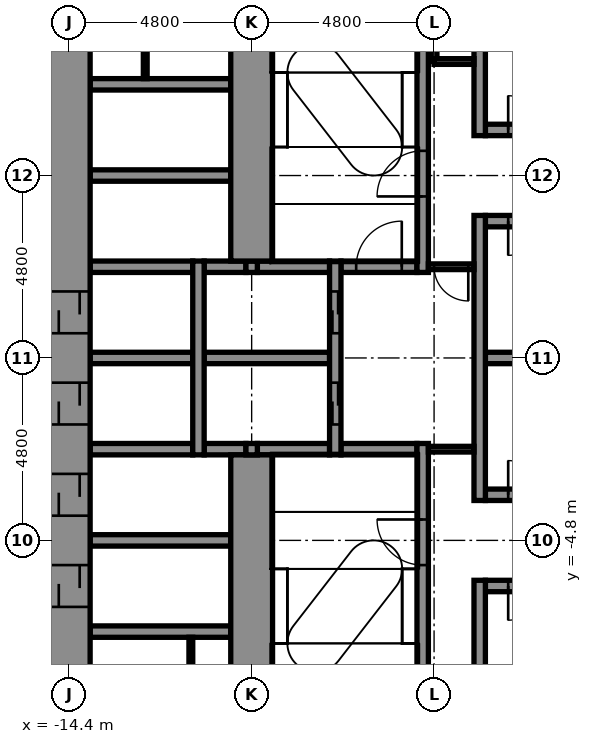
"""IFC4 building model, lengths in metres.
Left out: names, types, materials, properties, quantities, classifications, styles, units other than length and angle.
Written with IfcOpenShell. Run it as: python <this file> out.ifc"""

import sys

from ifc_helpers import new_model, si_unit, direction, frame, frame_2d, origin, place, context, subcontext, project, spatial, rectangle, extrude, element, fill, save


model = new_model("IFC4")
c1 = context("Model", 3, precision=1e-05, world=origin(), true_north=direction((0.0, 1.0)))
c2 = subcontext(c1, "Body", "Model", "MODEL_VIEW")
j1 = project(units=[si_unit("LENGTHUNIT", "METRE"), si_unit("PLANEANGLEUNIT", "RADIAN")], contexts=[c1])
p1 = place(None, origin())
s1 = spatial("IfcSite", under=j1, at=p1, CompositionType="ELEMENT")
p2 = place(p1, origin())
s2 = spatial("IfcBuilding", under=s1, at=p2, CompositionType="ELEMENT")
p3 = place(p2, frame((0.0, 0.0, 22.4)))
s3 = spatial("IfcBuildingStorey", under=s2, at=p3, CompositionType="ELEMENT", Elevation=22.4)
p4 = place(p3, frame((-13.85, -7.2, -0.25), z_axis=(0.0, 0.0, 1.0), x_axis=(1.0, 0.0, 0.0)))
e1 = element("IfcWall", 1, at=p4, inside=s3, PredefinedType="STANDARD", context=c2, shape_type="SweptSolid", body=[
    extrude(rectangle(XDim=3.7, YDim=0.3, at=frame_2d((1.85, 0.0))), origin(), (0.0, 0.0, 1.0), 5.5),
])
p5 = place(p3, frame((-3.45, -6.0, -0.25), z_axis=(0.0, 0.0, 1.0), x_axis=(1.0, 0.0, 0.0)))
e2 = element("IfcWall", 2, at=p5, inside=s3, PredefinedType="STANDARD", context=c2, shape_type="SweptSolid", body=[
    extrude(rectangle(XDim=2.1, YDim=0.3, at=frame_2d((1.05, 0.0))), origin(), (0.0, 0.0, 1.0), 5.5),
])
p6 = place(p5, frame((0.6, 0.0, 0.25)))
e3 = element("IfcOpeningElement", 3, at=p6, cuts=e2, PredefinedType="OPENING", context=c2, shape_type="SweptSolid", body=[
    extrude(rectangle(XDim=0.9, YDim=2.1, at=frame_2d((0.45, 1.05))), frame((0.0, 0.16, 0.0), z_axis=(0.0, -1.0, 0.0), x_axis=(1.0, 0.0, 0.0)), (0.0, 0.0, 1.0), 0.32),
])
p7 = place(p3, frame((-13.85, -4.8, -0.25), z_axis=(0.0, 0.0, 1.0), x_axis=(1.0, 0.0, 0.0)))
e4 = element("IfcWall", 4, at=p7, inside=s3, PredefinedType="STANDARD", context=c2, shape_type="SweptSolid", body=[
    extrude(rectangle(XDim=3.7, YDim=0.3, at=frame_2d((1.85, 0.0))), origin(), (0.0, 0.0, 1.0), 5.5),
])
p8 = place(p3, frame((-3.45, -3.6, -0.25), z_axis=(0.0, 0.0, 1.0), x_axis=(1.0, 0.0, 0.0)))
e5 = element("IfcWall", 5, at=p8, inside=s3, PredefinedType="STANDARD", context=c2, shape_type="SweptSolid", body=[
    extrude(rectangle(XDim=2.1, YDim=0.3, at=frame_2d((1.05, 0.0))), origin(), (0.0, 0.0, 1.0), 5.5),
])
p9 = place(p8, frame((0.6, 0.0, 0.25)))
e6 = element("IfcOpeningElement", 6, at=p9, cuts=e5, PredefinedType="OPENING", context=c2, shape_type="SweptSolid", body=[
    extrude(rectangle(XDim=0.9, YDim=2.1, at=frame_2d((0.45, 1.05))), frame((0.0, 0.16, 0.0), z_axis=(0.0, -1.0, 0.0), x_axis=(1.0, 0.0, 0.0)), (0.0, 0.0, 1.0), 0.32),
])
p10 = place(p3, frame((-13.85, -2.4, -0.25), z_axis=(0.0, 0.0, 1.0), x_axis=(1.0, 0.0, 0.0)))
e7 = element("IfcWall", 7, at=p10, inside=s3, PredefinedType="STANDARD", context=c2, shape_type="SweptSolid", body=[
    extrude(rectangle(XDim=2.7, YDim=0.3, at=frame_2d((1.35, 0.0))), origin(), (0.0, 0.0, 1.0), 5.5),
])
p11 = place(p3, frame((-10.85, -2.4, -0.25), z_axis=(0.0, 0.0, 1.0), x_axis=(1.0, 0.0, 0.0)))
e8 = element("IfcWall", 8, at=p11, inside=s3, PredefinedType="STANDARD", context=c2, shape_type="SweptSolid", body=[
    extrude(rectangle(XDim=1.1, YDim=0.3, at=frame_2d((0.55, 0.0))), origin(), (0.0, 0.0, 1.0), 5.5),
])
p12 = place(p3, frame((-9.45, -2.4, -0.25), z_axis=(0.0, 0.0, 1.0), x_axis=(1.0, 0.0, 0.0)))
e9 = element("IfcWall", 9, at=p12, inside=s3, PredefinedType="STANDARD", context=c2, shape_type="SweptSolid", body=[
    extrude(rectangle(XDim=1.9, YDim=0.3, at=frame_2d((0.95, 0.0))), origin(), (0.0, 0.0, 1.0), 5.5),
])
p13 = place(p3, frame((-7.25, -2.4, -0.25), z_axis=(0.0, 0.0, 1.0), x_axis=(1.0, 0.0, 0.0)))
e10 = element("IfcWall", 10, at=p13, inside=s3, PredefinedType="STANDARD", context=c2, shape_type="SweptSolid", body=[
    extrude(rectangle(XDim=2.0, YDim=0.3, at=frame_2d((1.0, 0.0))), origin(), (0.0, 0.0, 1.0), 5.5),
])
p14 = place(p3, frame((-13.85, 0.0, -0.25), z_axis=(0.0, 0.0, 1.0), x_axis=(1.0, 0.0, 0.0)))
e11 = element("IfcWall", 11, at=p14, inside=s3, PredefinedType="STANDARD", context=c2, shape_type="SweptSolid", body=[
    extrude(rectangle(XDim=2.7, YDim=0.3, at=frame_2d((1.35, 0.0))), origin(), (0.0, 0.0, 1.0), 5.5),
])
p15 = place(p3, frame((-10.85, 0.0, -0.25), z_axis=(0.0, 0.0, 1.0), x_axis=(1.0, 0.0, 0.0)))
e12 = element("IfcWall", 12, at=p15, inside=s3, PredefinedType="STANDARD", context=c2, shape_type="SweptSolid", body=[
    extrude(rectangle(XDim=3.3, YDim=0.3, at=frame_2d((1.65, 0.0))), origin(), (0.0, 0.0, 1.0), 5.5),
])
p16 = place(p3, frame((-3.45, 0.0, -0.25), z_axis=(0.0, 0.0, 1.0), x_axis=(1.0, 0.0, 0.0)))
e13 = element("IfcWall", 13, at=p16, inside=s3, PredefinedType="STANDARD", context=c2, shape_type="SweptSolid", body=[
    extrude(rectangle(XDim=2.1, YDim=0.3, at=frame_2d((1.05, 0.0))), origin(), (0.0, 0.0, 1.0), 5.5),
])
p17 = place(p3, frame((-13.85, 2.4, -0.25), z_axis=(0.0, 0.0, 1.0), x_axis=(1.0, 0.0, 0.0)))
e14 = element("IfcWall", 14, at=p17, inside=s3, PredefinedType="STANDARD", context=c2, shape_type="SweptSolid", body=[
    extrude(rectangle(XDim=2.7, YDim=0.3, at=frame_2d((1.35, 0.0))), origin(), (0.0, 0.0, 1.0), 5.5),
])
p18 = place(p3, frame((-10.85, 2.4, -0.25), z_axis=(0.0, 0.0, 1.0), x_axis=(1.0, 0.0, 0.0)))
e15 = element("IfcWall", 15, at=p18, inside=s3, PredefinedType="STANDARD", context=c2, shape_type="SweptSolid", body=[
    extrude(rectangle(XDim=1.1, YDim=0.3, at=frame_2d((0.55, 0.0))), origin(), (0.0, 0.0, 1.0), 5.5),
])
p19 = place(p3, frame((-9.45, 2.4, -0.25), z_axis=(0.0, 0.0, 1.0), x_axis=(1.0, 0.0, 0.0)))
e16 = element("IfcWall", 16, at=p19, inside=s3, PredefinedType="STANDARD", context=c2, shape_type="SweptSolid", body=[
    extrude(rectangle(XDim=1.9, YDim=0.3, at=frame_2d((0.95, 0.0))), origin(), (0.0, 0.0, 1.0), 5.5),
])
p20 = place(p3, frame((-7.25, 2.4, -0.25), z_axis=(0.0, 0.0, 1.0), x_axis=(1.0, 0.0, 0.0)))
e17 = element("IfcWall", 17, at=p20, inside=s3, PredefinedType="STANDARD", context=c2, shape_type="SweptSolid", body=[
    extrude(rectangle(XDim=2.0, YDim=0.3, at=frame_2d((1.0, 0.0))), origin(), (0.0, 0.0, 1.0), 5.5),
])
p21 = place(p20, frame((0.4, 0.0, 0.25)))
e18 = element("IfcOpeningElement", 18, at=p21, cuts=e17, PredefinedType="OPENING", context=c2, shape_type="SweptSolid", body=[
    extrude(rectangle(XDim=1.2, YDim=2.1, at=frame_2d((0.6, 1.05))), frame((0.0, 0.16, 0.0), z_axis=(0.0, -1.0, 0.0), x_axis=(1.0, 0.0, 0.0)), (0.0, 0.0, 1.0), 0.32),
])
p22 = place(p3, frame((-3.45, 3.6, -0.25), z_axis=(0.0, 0.0, 1.0), x_axis=(1.0, 0.0, 0.0)))
e19 = element("IfcWall", 19, at=p22, inside=s3, PredefinedType="STANDARD", context=c2, shape_type="SweptSolid", body=[
    extrude(rectangle(XDim=2.1, YDim=0.3, at=frame_2d((1.05, 0.0))), origin(), (0.0, 0.0, 1.0), 5.5),
])
p23 = place(p22, frame((0.6, 0.0, 0.25)))
e20 = element("IfcOpeningElement", 20, at=p23, cuts=e19, PredefinedType="OPENING", context=c2, shape_type="SweptSolid", body=[
    extrude(rectangle(XDim=0.9, YDim=2.1, at=frame_2d((0.45, 1.05))), frame((0.0, 0.16, 0.0), z_axis=(0.0, -1.0, 0.0), x_axis=(1.0, 0.0, 0.0)), (0.0, 0.0, 1.0), 0.32),
])
p24 = place(p3, frame((-13.85, 4.8, -0.25), z_axis=(0.0, 0.0, 1.0), x_axis=(1.0, 0.0, 0.0)))
e21 = element("IfcWall", 21, at=p24, inside=s3, PredefinedType="STANDARD", context=c2, shape_type="SweptSolid", body=[
    extrude(rectangle(XDim=3.7, YDim=0.3, at=frame_2d((1.85, 0.0))), origin(), (0.0, 0.0, 1.0), 5.5),
])
p25 = place(p3, frame((-3.45, 6.0, -0.25), z_axis=(0.0, 0.0, 1.0), x_axis=(1.0, 0.0, 0.0)))
e22 = element("IfcWall", 22, at=p25, inside=s3, PredefinedType="STANDARD", context=c2, shape_type="SweptSolid", body=[
    extrude(rectangle(XDim=2.1, YDim=0.3, at=frame_2d((1.05, 0.0))), origin(), (0.0, 0.0, 1.0), 5.5),
])
p26 = place(p25, frame((0.6, 0.0, 0.25)))
e23 = element("IfcOpeningElement", 23, at=p26, cuts=e22, PredefinedType="OPENING", context=c2, shape_type="SweptSolid", body=[
    extrude(rectangle(XDim=0.9, YDim=2.1, at=frame_2d((0.45, 1.05))), frame((0.0, 0.16, 0.0), z_axis=(0.0, -1.0, 0.0), x_axis=(1.0, 0.0, 0.0)), (0.0, 0.0, 1.0), 0.32),
])
p27 = place(p3, frame((-13.85, 7.2, -0.25), z_axis=(0.0, 0.0, 1.0), x_axis=(1.0, 0.0, 0.0)))
e24 = element("IfcWall", 24, at=p27, inside=s3, PredefinedType="STANDARD", context=c2, shape_type="SweptSolid", body=[
    extrude(rectangle(XDim=3.7, YDim=0.3, at=frame_2d((1.85, 0.0))), origin(), (0.0, 0.0, 1.0), 5.5),
])
p28 = place(p3, frame((-14.4, -10.15, -0.25), z_axis=(0.0, 0.0, 1.0), x_axis=(0.0, 1.0, 0.0)))
e25 = element("IfcWall", 25, at=p28, inside=s3, PredefinedType="SHEAR", context=c2, shape_type="SweptSolid", body=[
    extrude(rectangle(XDim=20.3, YDim=1.1, at=frame_2d((10.15, 0.0))), origin(), (0.0, 0.0, 1.0), 5.5),
])
p29 = place(p28, frame((3.6, 0.0, 0.25)))
e26 = element("IfcOpeningElement", 26, at=p29, cuts=e25, PredefinedType="OPENING", context=c2, shape_type="SweptSolid", body=[
    extrude(rectangle(XDim=1.1, YDim=2.1, at=frame_2d((0.55, 1.05))), frame((0.0, 0.56, 0.0), z_axis=(0.0, -1.0, 0.0), x_axis=(1.0, 0.0, 0.0)), (0.0, 0.0, 1.0), 1.12),
])
p30 = place(p28, frame((6.0, 0.0, 0.25)))
e27 = element("IfcOpeningElement", 27, at=p30, cuts=e25, PredefinedType="OPENING", context=c2, shape_type="SweptSolid", body=[
    extrude(rectangle(XDim=1.1, YDim=2.1, at=frame_2d((0.55, 1.05))), frame((0.0, 0.56, 0.0), z_axis=(0.0, -1.0, 0.0), x_axis=(1.0, 0.0, 0.0)), (0.0, 0.0, 1.0), 1.12),
])
p31 = place(p28, frame((8.4, 0.0, 0.25)))
e28 = element("IfcOpeningElement", 28, at=p31, cuts=e25, PredefinedType="OPENING", context=c2, shape_type="SweptSolid", body=[
    extrude(rectangle(XDim=1.1, YDim=2.1, at=frame_2d((0.55, 1.05))), frame((0.0, 0.56, 0.0), z_axis=(0.0, -1.0, 0.0), x_axis=(1.0, 0.0, 0.0)), (0.0, 0.0, 1.0), 1.12),
])
p32 = place(p28, frame((10.8, 0.0, 0.25)))
e29 = element("IfcOpeningElement", 29, at=p32, cuts=e25, PredefinedType="OPENING", context=c2, shape_type="SweptSolid", body=[
    extrude(rectangle(XDim=1.1, YDim=2.1, at=frame_2d((0.55, 1.05))), frame((0.0, 0.56, 0.0), z_axis=(0.0, -1.0, 0.0), x_axis=(1.0, 0.0, 0.0)), (0.0, 0.0, 1.0), 1.12),
])
p33 = place(p3, frame((-11.0, -2.55, -0.25), z_axis=(0.0, 0.0, 1.0), x_axis=(0.0, 1.0, 0.0)))
e30 = element("IfcWall", 30, at=p33, inside=s3, PredefinedType="STANDARD", context=c2, shape_type="SweptSolid", body=[
    extrude(rectangle(XDim=5.1, YDim=0.3, at=frame_2d((2.55, 0.0))), origin(), (0.0, 0.0, 1.0), 5.5),
])
p34 = place(p3, frame((-9.6, -10.15, -0.25), z_axis=(0.0, 0.0, 1.0), x_axis=(0.0, 1.0, 0.0)))
e31 = element("IfcWall", 31, at=p34, inside=s3, PredefinedType="SHEAR", context=c2, shape_type="SweptSolid", body=[
    extrude(rectangle(XDim=7.6, YDim=1.1, at=frame_2d((3.8, 0.0))), origin(), (0.0, 0.0, 1.0), 5.5),
])
for number, where, z_axis, x_axis in (
    (32, (-9.6, -2.55, -0.25), (0.0, 0.0, 1.0), (0.0, 1.0, 0.0)),
    (33, (-9.6, 2.25, -0.25), (0.0, 0.0, 1.0), (0.0, 1.0, 0.0)),
):
    element("IfcWall", number, at=place(p3, frame(where, z_axis=z_axis, x_axis=x_axis)), inside=s3, PredefinedType="STANDARD", context=c2, shape_type="SweptSolid", body=[
        extrude(rectangle(XDim=0.3, YDim=0.3, at=frame_2d((0.15, 0.0))), origin(), (0.0, 0.0, 1.0), 5.5),
    ])
p35 = place(p3, frame((-9.6, 2.55, -0.25), z_axis=(0.0, 0.0, 1.0), x_axis=(0.0, 1.0, 0.0)))
e34 = element("IfcWall", 34, at=p35, inside=s3, PredefinedType="SHEAR", context=c2, shape_type="SweptSolid", body=[
    extrude(rectangle(XDim=7.6, YDim=1.1, at=frame_2d((3.8, 0.0))), origin(), (0.0, 0.0, 1.0), 5.5),
])
p36 = place(p3, frame((-7.4, -2.55, -0.25), z_axis=(0.0, 0.0, 1.0), x_axis=(0.0, 1.0, 0.0)))
e35 = element("IfcWall", 35, at=p36, inside=s3, PredefinedType="STANDARD", context=c2, shape_type="SweptSolid", body=[
    extrude(rectangle(XDim=5.1, YDim=0.3, at=frame_2d((2.55, 0.0))), origin(), (0.0, 0.0, 1.0), 5.5),
])
p37 = place(p36, frame((0.8, 0.0, 0.25)))
e36 = element("IfcOpeningElement", 36, at=p37, cuts=e35, PredefinedType="OPENING", context=c2, shape_type="SweptSolid", body=[
    extrude(rectangle(XDim=1.1, YDim=2.1, at=frame_2d((0.55, 1.05))), frame((0.0, 0.16, 0.0), z_axis=(0.0, -1.0, 0.0), x_axis=(1.0, 0.0, 0.0)), (0.0, 0.0, 1.0), 0.32),
])
p38 = place(p36, frame((3.2, 0.0, 0.25)))
e37 = element("IfcOpeningElement", 37, at=p38, cuts=e35, PredefinedType="OPENING", context=c2, shape_type="SweptSolid", body=[
    extrude(rectangle(XDim=1.1, YDim=2.1, at=frame_2d((0.55, 1.05))), frame((0.0, 0.16, 0.0), z_axis=(0.0, -1.0, 0.0), x_axis=(1.0, 0.0, 0.0)), (0.0, 0.0, 1.0), 0.32),
])
p39 = place(p3, frame((-5.1, -9.05, -0.25), z_axis=(0.0, 0.0, 1.0), x_axis=(0.0, 1.0, 0.0)))
e38 = element("IfcWall", 38, at=p39, inside=s3, PredefinedType="STANDARD", context=c2, shape_type="SweptSolid", body=[
    extrude(rectangle(XDim=6.8, YDim=0.3, at=frame_2d((3.4, 0.0))), origin(), (0.0, 0.0, 1.0), 5.5),
])
p40 = place(p39, frame((3.6, 0.0, 0.25)))
e39 = element("IfcOpeningElement", 39, at=p40, cuts=e38, PredefinedType="OPENING", context=c2, shape_type="SweptSolid", body=[
    extrude(rectangle(XDim=1.2, YDim=2.1, at=frame_2d((0.6, 1.05))), frame((0.0, 0.16, 0.0), z_axis=(0.0, -1.0, 0.0), x_axis=(1.0, 0.0, 0.0)), (0.0, 0.0, 1.0), 0.32),
])
p41 = place(p3, frame((-5.1, 2.25, -0.25), z_axis=(0.0, 0.0, 1.0), x_axis=(0.0, 1.0, 0.0)))
e40 = element("IfcWall", 40, at=p41, inside=s3, PredefinedType="STANDARD", context=c2, shape_type="SweptSolid", body=[
    extrude(rectangle(XDim=6.8, YDim=0.3, at=frame_2d((3.4, 0.0))), origin(), (0.0, 0.0, 1.0), 5.5),
])
p42 = place(p41, frame((2.0, 0.0, 0.25)))
e41 = element("IfcOpeningElement", 41, at=p42, cuts=e40, PredefinedType="OPENING", context=c2, shape_type="SweptSolid", body=[
    extrude(rectangle(XDim=1.2, YDim=2.1, at=frame_2d((0.6, 1.05))), frame((0.0, 0.16, 0.0), z_axis=(0.0, -1.0, 0.0), x_axis=(1.0, 0.0, 0.0)), (0.0, 0.0, 1.0), 0.32),
])
p43 = place(p3, frame((-3.6, -9.05, -0.25), z_axis=(0.0, 0.0, 1.0), x_axis=(0.0, 1.0, 0.0)))
e42 = element("IfcWall", 42, at=p43, inside=s3, PredefinedType="STANDARD", context=c2, shape_type="SweptSolid", body=[
    extrude(rectangle(XDim=3.2, YDim=0.3, at=frame_2d((1.6, 0.0))), origin(), (0.0, 0.0, 1.0), 5.5),
])
p44 = place(p3, frame((-3.6, -3.75, -0.25), z_axis=(0.0, 0.0, 1.0), x_axis=(0.0, 1.0, 0.0)))
e43 = element("IfcWall", 43, at=p44, inside=s3, PredefinedType="STANDARD", context=c2, shape_type="SweptSolid", body=[
    extrude(rectangle(XDim=7.5, YDim=0.3, at=frame_2d((3.75, 0.0))), origin(), (0.0, 0.0, 1.0), 5.5),
])
p45 = place(p3, frame((-3.6, 5.85, -0.25), z_axis=(0.0, 0.0, 1.0), x_axis=(0.0, 1.0, 0.0)))
e44 = element("IfcWall", 44, at=p45, inside=s3, PredefinedType="STANDARD", context=c2, shape_type="SweptSolid", body=[
    extrude(rectangle(XDim=3.2, YDim=0.3, at=frame_2d((1.6, 0.0))), origin(), (0.0, 0.0, 1.0), 5.5),
])
p46 = place(p3, frame((-4.8, 7.8, 0.0), z_axis=(0.0, 0.0, 1.0), x_axis=(0.0, 1.0, 0.0)))
e45 = element("IfcWall", 45, at=p46, inside=s3, PredefinedType="PARTITIONING", context=c2, shape_type="SweptSolid", body=[
    extrude(rectangle(XDim=1.25, YDim=0.15, at=frame_2d((0.625, 0.0))), origin(), (0.0, 0.0, 1.0), 5.25),
])
for number, where, z_axis, x_axis in (
    (46, (-11.2, -9.05, 0.0), (0.0, 0.0, 1.0), (0.0, 1.0, 0.0)),
    (47, (-12.4, 7.35, 0.0), (0.0, 0.0, 1.0), (0.0, 1.0, 0.0)),
):
    element("IfcWall", number, at=place(p3, frame(where, z_axis=z_axis, x_axis=x_axis)), inside=s3, PredefinedType="PARTITIONING", context=c2, shape_type="SweptSolid", body=[
        extrude(rectangle(XDim=1.7, YDim=0.1, at=frame_2d((0.85, 0.0))), origin(), (0.0, 0.0, 1.0), 5.25),
    ])
p47 = place(p3, frame((-4.8, 7.8, 0.0), z_axis=(0.0, 0.0, 1.0), x_axis=(1.0, 0.0, 0.0)))
e48 = element("IfcWall", 48, at=p47, inside=s3, PredefinedType="PARTITIONING", context=c2, shape_type="SweptSolid", body=[
    extrude(rectangle(XDim=1.05, YDim=0.15, at=frame_2d((0.525, 0.0))), origin(), (0.0, 0.0, 1.0), 5.25),
])
p48 = place(p3, frame((-4.95, 2.4, 0.0), z_axis=(0.0, 0.0, 1.0), x_axis=(1.0, 0.0, 0.0)))
e49 = element("IfcWall", 49, at=p48, inside=s3, PredefinedType="PARTITIONING", context=c2, shape_type="SweptSolid", body=[
    extrude(rectangle(XDim=1.2, YDim=0.15, at=frame_2d((0.6, 0.0))), origin(), (0.0, 0.0, 1.0), 5.25),
])
p49 = place(p48, frame((0.15, 0.0, 0.0)))
e50 = element("IfcOpeningElement", 50, at=p49, cuts=e49, PredefinedType="OPENING", context=c2, shape_type="SweptSolid", body=[
    extrude(rectangle(XDim=0.9, YDim=2.1, at=frame_2d((0.45, 1.05))), frame((0.0, 0.085, 0.0), z_axis=(0.0, -1.0, 0.0), x_axis=(1.0, 0.0, 0.0)), (0.0, 0.0, 1.0), 0.17),
])
p50 = place(p3, frame((-4.95, -2.4, 0.0), z_axis=(0.0, 0.0, 1.0), x_axis=(1.0, 0.0, 0.0)))
e51 = element("IfcWall", 51, at=p50, inside=s3, PredefinedType="PARTITIONING", context=c2, shape_type="SweptSolid", body=[
    extrude(rectangle(XDim=1.2, YDim=0.15, at=frame_2d((0.6, 0.0))), origin(), (0.0, 0.0, 1.0), 5.25),
])
p51 = place(p37, origin())
e52 = element("IfcDoor", 52, at=p51, inside=s3, OperationType="DOUBLE_DOOR_SLIDING", PredefinedType="DOOR", context=c2, shape_type="SweptSolid", body=[
    extrude(rectangle(XDim=1.1, YDim=2.1, at=frame_2d((0.55, 1.05))), frame((0.0, 0.025, 0.0), z_axis=(0.0, -1.0, 0.0), x_axis=(1.0, 0.0, 0.0)), (0.0, 0.0, 1.0), 0.05),
])
fill(e36, e52)
p52 = place(p38, origin())
e53 = element("IfcDoor", 53, at=p52, inside=s3, OperationType="DOUBLE_DOOR_SLIDING", PredefinedType="DOOR", context=c2, shape_type="SweptSolid", body=[
    extrude(rectangle(XDim=1.1, YDim=2.1, at=frame_2d((0.55, 1.05))), frame((0.0, 0.025, 0.0), z_axis=(0.0, -1.0, 0.0), x_axis=(1.0, 0.0, 0.0)), (0.0, 0.0, 1.0), 0.05),
])
fill(e37, e53)
p53 = place(p29, origin())
e54 = element("IfcDoor", 54, at=p53, inside=s3, OperationType="DOUBLE_DOOR_SLIDING", PredefinedType="DOOR", context=c2, shape_type="SweptSolid", body=[
    extrude(rectangle(XDim=1.1, YDim=2.1, at=frame_2d((0.55, 1.05))), frame((0.0, 0.025, 0.0), z_axis=(0.0, -1.0, 0.0), x_axis=(1.0, 0.0, 0.0)), (0.0, 0.0, 1.0), 0.05),
])
fill(e26, e54)
p54 = place(p30, origin())
e55 = element("IfcDoor", 55, at=p54, inside=s3, OperationType="DOUBLE_DOOR_SLIDING", PredefinedType="DOOR", context=c2, shape_type="SweptSolid", body=[
    extrude(rectangle(XDim=1.1, YDim=2.1, at=frame_2d((0.55, 1.05))), frame((0.0, 0.025, 0.0), z_axis=(0.0, -1.0, 0.0), x_axis=(1.0, 0.0, 0.0)), (0.0, 0.0, 1.0), 0.05),
])
fill(e27, e55)
p55 = place(p31, origin())
e56 = element("IfcDoor", 56, at=p55, inside=s3, OperationType="DOUBLE_DOOR_SLIDING", PredefinedType="DOOR", context=c2, shape_type="SweptSolid", body=[
    extrude(rectangle(XDim=1.1, YDim=2.1, at=frame_2d((0.55, 1.05))), frame((0.0, 0.025, 0.0), z_axis=(0.0, -1.0, 0.0), x_axis=(1.0, 0.0, 0.0)), (0.0, 0.0, 1.0), 0.05),
])
fill(e28, e56)
p56 = place(p32, origin())
e57 = element("IfcDoor", 57, at=p56, inside=s3, OperationType="DOUBLE_DOOR_SLIDING", PredefinedType="DOOR", context=c2, shape_type="SweptSolid", body=[
    extrude(rectangle(XDim=1.1, YDim=2.1, at=frame_2d((0.55, 1.05))), frame((0.0, 0.025, 0.0), z_axis=(0.0, -1.0, 0.0), x_axis=(1.0, 0.0, 0.0)), (0.0, 0.0, 1.0), 0.05),
])
fill(e29, e57)
p57 = place(p42, origin())
e58 = element("IfcDoor", 58, at=p57, inside=s3, OperationType="SINGLE_SWING_LEFT", PredefinedType="DOOR", context=c2, shape_type="SweptSolid", body=[
    extrude(rectangle(XDim=1.2, YDim=2.1, at=frame_2d((0.6, 1.05))), frame((0.0, 0.025, 0.0), z_axis=(0.0, -1.0, 0.0), x_axis=(1.0, 0.0, 0.0)), (0.0, 0.0, 1.0), 0.05),
])
fill(e41, e58)
p58 = place(p40, origin())
e59 = element("IfcDoor", 59, at=p58, inside=s3, OperationType="SINGLE_SWING_RIGHT", PredefinedType="DOOR", context=c2, shape_type="SweptSolid", body=[
    extrude(rectangle(XDim=1.2, YDim=2.1, at=frame_2d((0.6, 1.05))), frame((0.0, 0.025, 0.0), z_axis=(0.0, -1.0, 0.0), x_axis=(1.0, 0.0, 0.0)), (0.0, 0.0, 1.0), 0.05),
])
fill(e39, e59)
p59 = place(p26, origin())
e60 = element("IfcDoor", 60, at=p59, inside=s3, OperationType="SINGLE_SWING_LEFT", PredefinedType="DOOR", context=c2, shape_type="SweptSolid", body=[
    extrude(rectangle(XDim=0.9, YDim=2.1, at=frame_2d((0.45, 1.05))), frame((0.0, 0.025, 0.0), z_axis=(0.0, -1.0, 0.0), x_axis=(1.0, 0.0, 0.0)), (0.0, 0.0, 1.0), 0.05),
])
fill(e23, e60)
p60 = place(p23, frame((0.9, 0.0, 0.0), z_axis=(0.0, 0.0, 1.0), x_axis=(-1.0, 0.0, 0.0)))
e61 = element("IfcDoor", 61, at=p60, inside=s3, OperationType="SINGLE_SWING_LEFT", PredefinedType="DOOR", context=c2, shape_type="SweptSolid", body=[
    extrude(rectangle(XDim=0.9, YDim=2.1, at=frame_2d((0.45, 1.05))), frame((0.0, 0.025, 0.0), z_axis=(0.0, -1.0, 0.0), x_axis=(1.0, 0.0, 0.0)), (0.0, 0.0, 1.0), 0.05),
])
fill(e20, e61)
p61 = place(p9, origin())
e62 = element("IfcDoor", 62, at=p61, inside=s3, OperationType="SINGLE_SWING_LEFT", PredefinedType="DOOR", context=c2, shape_type="SweptSolid", body=[
    extrude(rectangle(XDim=0.9, YDim=2.1, at=frame_2d((0.45, 1.05))), frame((0.0, 0.025, 0.0), z_axis=(0.0, -1.0, 0.0), x_axis=(1.0, 0.0, 0.0)), (0.0, 0.0, 1.0), 0.05),
])
fill(e6, e62)
p62 = place(p6, frame((0.9, 0.0, 0.0), z_axis=(0.0, 0.0, 1.0), x_axis=(-1.0, 0.0, 0.0)))
e63 = element("IfcDoor", 63, at=p62, inside=s3, OperationType="SINGLE_SWING_LEFT", PredefinedType="DOOR", context=c2, shape_type="SweptSolid", body=[
    extrude(rectangle(XDim=0.9, YDim=2.1, at=frame_2d((0.45, 1.05))), frame((0.0, 0.025, 0.0), z_axis=(0.0, -1.0, 0.0), x_axis=(1.0, 0.0, 0.0)), (0.0, 0.0, 1.0), 0.05),
])
fill(e3, e63)
p63 = place(p49, frame((0.9, 0.0, 0.0), z_axis=(0.0, 0.0, 1.0), x_axis=(-1.0, 0.0, 0.0)))
e64 = element("IfcDoor", 64, at=p63, inside=s3, OperationType="SINGLE_SWING_RIGHT", PredefinedType="DOOR", context=c2, shape_type="SweptSolid", body=[
    extrude(rectangle(XDim=0.9, YDim=2.1, at=frame_2d((0.45, 1.05))), frame((0.0, 0.025, 0.0), z_axis=(0.0, -1.0, 0.0), x_axis=(1.0, 0.0, 0.0)), (0.0, 0.0, 1.0), 0.05),
])
fill(e50, e64)
p64 = place(p21, origin())
e65 = element("IfcDoor", 65, at=p64, inside=s3, OperationType="SINGLE_SWING_RIGHT", PredefinedType="DOOR", context=c2, shape_type="SweptSolid", body=[
    extrude(rectangle(XDim=1.2, YDim=2.1, at=frame_2d((0.6, 1.05))), frame((0.0, 0.025, 0.0), z_axis=(0.0, -1.0, 0.0), x_axis=(1.0, 0.0, 0.0)), (0.0, 0.0, 1.0), 0.05),
])
fill(e18, e65)
save(model, sys.argv[1])
